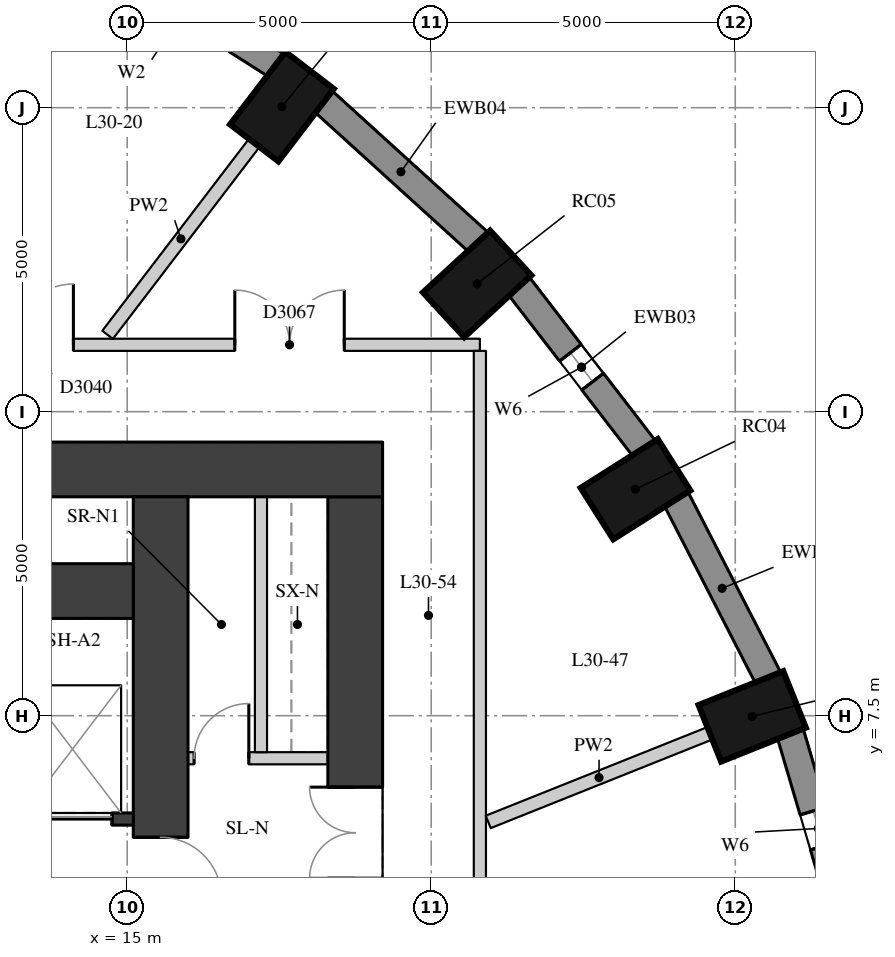
"""IFC4 building model, lengths in metres.
Left out: names, types, materials, properties, quantities, classifications, styles, units other than length and angle.
Written with IfcOpenShell. Run it as: python <this file> out.ifc"""

import sys

from ifc_helpers import new_model, si_unit, direction, frame, frame_2d, origin, origin_2d, place, context, subcontext, project, spatial, rectangle, extrude, element, fill, save


model = new_model("IFC4")
c1 = context("Model", 3, precision=1e-05, world=origin(), true_north=direction((0.0, 1.0)))
c2 = subcontext(c1, "Body", "Model", "MODEL_VIEW")
j1 = project(units=[si_unit("LENGTHUNIT", "METRE"), si_unit("PLANEANGLEUNIT", "RADIAN")], contexts=[c1])
p1 = place(None, origin())
s1 = spatial("IfcSite", under=j1, at=p1, CompositionType="ELEMENT")
p2 = place(p1, origin())
s2 = spatial("IfcBuilding", under=s1, at=p2, CompositionType="ELEMENT")
p3 = place(p2, frame((0.0, 0.0, 108.7)))
s3 = spatial("IfcBuildingStorey", under=s2, at=p3, CompositionType="ELEMENT", Elevation=108.7)
for number, where, z_axis, x_axis in (
    (1, (25.279, 7.489, 0.0), (0.0, 0.0, 1.0), (0.929, 0.371, 0.0)),
    (2, (23.36, 11.225, 0.0), (0.0, 0.0, 1.0), (0.845, 0.536, 0.0)),
    (3, (20.755, 14.602, 0.0), (0.0, 0.0, 1.0), (0.735, 0.678, 0.0)),
    (4, (17.545, 17.517, 0.0), (0.0, 0.0, 1.0), (0.607, 0.795, 0.0)),
):
    element("IfcColumn", number, at=place(p3, frame(where, z_axis=z_axis, x_axis=x_axis)), inside=s3, PredefinedType="COLUMN", context=c2, shape_type="SweptSolid", body=[
        extrude(rectangle(XDim=1.5, YDim=1.0, at=origin_2d()), origin(), (0.0, 0.0, 1.0), 3.3),
    ])
p4 = place(p3, frame((26.832, 4.069, 0.0), z_axis=(0.0, 0.0, 1.0), x_axis=(-0.283002902729, 0.959119052593, 0.0)))
e5 = element("IfcWall", 5, at=p4, inside=s3, PredefinedType="SOLIDWALL", context=c2, shape_type="SweptSolid", body=[
    extrude(rectangle(XDim=3.286, YDim=0.45, at=frame_2d((1.643, 0.0))), origin(), (0.0, 0.0, 1.0), 3.02),
])
p5 = place(p4, frame((1.343, 0.0, 0.4)))
e6 = element("IfcOpeningElement", 6, at=p5, cuts=e5, PredefinedType="OPENING", context=c2, shape_type="SweptSolid", body=[
    extrude(rectangle(XDim=0.6, YDim=1.75, at=frame_2d((0.3, 0.875))), frame((0.0, 0.235, 0.0), z_axis=(0.0, -1.0, 0.0), x_axis=(1.0, 0.0, 0.0)), (0.0, 0.0, 1.0), 0.47),
])
p6 = place(p3, frame((25.545, 8.112, 0.0), z_axis=(0.0, 0.0, 1.0), x_axis=(-0.456828186229, 0.889554949549, 0.0)))
e7 = element("IfcWall", 7, at=p6, inside=s3, PredefinedType="SOLIDWALL", context=c2, shape_type="SweptSolid", body=[
    extrude(rectangle(XDim=3.333, YDim=0.45, at=frame_2d((1.667, 0.0))), origin(), (0.0, 0.0, 1.0), 3.02),
])
p7 = place(p3, frame((23.508, 11.887, 0.0), z_axis=(0.0, 0.0, 1.0), x_axis=(-0.610693945156, 0.791866721961, 0.0)))
e8 = element("IfcWall", 8, at=p7, inside=s3, PredefinedType="SOLIDWALL", context=c2, shape_type="SweptSolid", body=[
    extrude(rectangle(XDim=3.395, YDim=0.45, at=frame_2d((1.697, 0.0))), origin(), (0.0, 0.0, 1.0), 3.02),
])
p8 = place(p7, frame((1.397, 0.0, 0.4)))
e9 = element("IfcOpeningElement", 9, at=p8, cuts=e8, PredefinedType="OPENING", context=c2, shape_type="SweptSolid", body=[
    extrude(rectangle(XDim=0.6, YDim=1.75, at=frame_2d((0.3, 0.875))), frame((0.0, 0.235, 0.0), z_axis=(0.0, -1.0, 0.0), x_axis=(1.0, 0.0, 0.0)), (0.0, 0.0, 1.0), 0.47),
])
p9 = place(p3, frame((20.784, 15.281, 0.0), z_axis=(0.0, 0.0, 1.0), x_axis=(-0.74032902847, 0.672244694739, 0.0)))
e10 = element("IfcWall", 10, at=p9, inside=s3, PredefinedType="SOLIDWALL", context=c2, shape_type="SweptSolid", body=[
    extrude(rectangle(XDim=3.464, YDim=0.45, at=frame_2d((1.732, 0.0))), origin(), (0.0, 0.0, 1.0), 3.02),
])
p10 = place(p3, frame((17.456, 18.192, 0.0), z_axis=(0.0, 0.0, 1.0), x_axis=(-0.843880549131, 0.536531097699, 0.0)))
e11 = element("IfcWall", 11, at=p10, inside=s3, PredefinedType="SOLIDWALL", context=c2, shape_type="SweptSolid", body=[
    extrude(rectangle(XDim=3.532, YDim=0.45, at=frame_2d((1.766, 0.0))), origin(), (0.0, 0.0, 1.0), 3.02),
])
p11 = place(p10, frame((0.766, 0.0, 0.4)))
e12 = element("IfcOpeningElement", 12, at=p11, cuts=e11, PredefinedType="OPENING", context=c2, shape_type="SweptSolid", body=[
    extrude(rectangle(XDim=2.0, YDim=1.75, at=frame_2d((1.0, 0.875))), frame((0.0, 0.235, 0.0), z_axis=(0.0, -1.0, 0.0), x_axis=(1.0, 0.0, 0.0)), (0.0, 0.0, 1.0), 0.47),
])
p12 = place(p3, frame((18.75, -11.1, 0.0), z_axis=(0.0, 0.0, 1.0), x_axis=(0.0, 1.0, 0.0)))
e13 = element("IfcWall", 13, at=p12, inside=s3, PredefinedType="SHEAR", context=c2, shape_type="SweptSolid", body=[
    extrude(rectangle(XDim=22.2, YDim=0.9, at=frame_2d((11.1, 0.0))), origin(), (0.0, 0.0, 1.0), 3.02),
])
p13 = place(p12, frame((15.925, 0.0, 0.0)))
e14 = element("IfcOpeningElement", 14, at=p13, cuts=e13, PredefinedType="OPENING", context=c2, shape_type="SweptSolid", body=[
    extrude(rectangle(XDim=1.5, YDim=2.1, at=frame_2d((0.75, 1.05))), frame((0.0, 0.46, 0.0), z_axis=(0.0, -1.0, 0.0), x_axis=(1.0, 0.0, 0.0)), (0.0, 0.0, 1.0), 0.92),
])
p14 = place(p12, frame((4.525, 0.0, 0.0)))
e15 = element("IfcOpeningElement", 15, at=p14, cuts=e13, PredefinedType="OPENING", context=c2, shape_type="SweptSolid", body=[
    extrude(rectangle(XDim=1.5, YDim=2.1, at=frame_2d((0.75, 1.05))), frame((0.0, 0.46, 0.0), z_axis=(0.0, -1.0, 0.0), x_axis=(1.0, 0.0, 0.0)), (0.0, 0.0, 1.0), 0.92),
])
p15 = place(p3, frame((4.0, 11.55, 0.0), z_axis=(0.0, 0.0, 1.0), x_axis=(1.0, 0.0, 0.0)))
e16 = element("IfcWall", 16, at=p15, inside=s3, PredefinedType="SHEAR", context=c2, shape_type="SweptSolid", body=[
    extrude(rectangle(XDim=15.2, YDim=0.9, at=frame_2d((7.6, 0.0))), origin(), (0.0, 0.0, 1.0), 3.02),
])
p16 = place(p3, frame((15.55, -11.1, 0.0), z_axis=(0.0, 0.0, 1.0), x_axis=(0.0, 1.0, 0.0)))
e17 = element("IfcWall", 17, at=p16, inside=s3, PredefinedType="SHEAR", context=c2, shape_type="SweptSolid", body=[
    extrude(rectangle(XDim=22.2, YDim=0.9, at=frame_2d((11.1, 0.0))), origin(), (0.0, 0.0, 1.0), 3.02),
])
p17 = place(p16, frame((15.6, 0.0, 0.0)))
e18 = element("IfcOpeningElement", 18, at=p17, cuts=e17, PredefinedType="OPENING", context=c2, shape_type="SweptSolid", body=[
    extrude(rectangle(XDim=1.0, YDim=2.1, at=frame_2d((0.5, 1.05))), frame((0.0, 0.46, 0.0), z_axis=(0.0, -1.0, 0.0), x_axis=(1.0, 0.0, 0.0)), (0.0, 0.0, 1.0), 0.92),
])
p18 = place(p16, frame((5.6, 0.0, 0.0)))
e19 = element("IfcOpeningElement", 19, at=p18, cuts=e17, PredefinedType="OPENING", context=c2, shape_type="SweptSolid", body=[
    extrude(rectangle(XDim=1.0, YDim=2.1, at=frame_2d((0.5, 1.05))), frame((0.0, 0.46, 0.0), z_axis=(0.0, -1.0, 0.0), x_axis=(1.0, 0.0, 0.0)), (0.0, 0.0, 1.0), 0.92),
])
p19 = place(p3, frame((4.9, 9.55, 0.0), z_axis=(0.0, 0.0, 1.0), x_axis=(1.0, 0.0, 0.0)))
e20 = element("IfcWall", 20, at=p19, inside=s3, PredefinedType="SHEAR", context=c2, shape_type="SweptSolid", body=[
    extrude(rectangle(XDim=10.2, YDim=0.9, at=frame_2d((5.1, 0.0))), origin(), (0.0, 0.0, 1.0), 3.02),
])
p20 = place(p3, frame((4.9, 5.8, 0.0), z_axis=(0.0, 0.0, 1.0), x_axis=(1.0, 0.0, 0.0)))
e21 = element("IfcWall", 21, at=p20, inside=s3, PredefinedType="SHEAR", context=c2, shape_type="SweptSolid", body=[
    extrude(rectangle(XDim=10.2, YDim=0.2, at=frame_2d((5.1, 0.0))), origin(), (0.0, 0.0, 1.0), 3.02),
])
p21 = place(p20, frame((6.75, 0.0, 0.0)))
e22 = element("IfcOpeningElement", 22, at=p21, cuts=e21, PredefinedType="OPENING", context=c2, shape_type="SweptSolid", body=[
    extrude(rectangle(XDim=1.1, YDim=2.1, at=frame_2d((0.55, 1.05))), frame((0.0, 0.11, 0.0), z_axis=(0.0, -1.0, 0.0), x_axis=(1.0, 0.0, 0.0)), (0.0, 0.0, 1.0), 0.22),
])
p22 = place(p20, frame((8.75, 0.0, 0.0)))
e23 = element("IfcOpeningElement", 23, at=p22, cuts=e21, PredefinedType="OPENING", context=c2, shape_type="SweptSolid", body=[
    extrude(rectangle(XDim=1.1, YDim=2.1, at=frame_2d((0.55, 1.05))), frame((0.0, 0.11, 0.0), z_axis=(0.0, -1.0, 0.0), x_axis=(1.0, 0.0, 0.0)), (0.0, 0.0, 1.0), 0.22),
])
p23 = place(p3, frame((16.0, 6.8, 0.0), z_axis=(0.0, 0.0, 1.0), x_axis=(1.0, 0.0, 0.0)))
e24 = element("IfcWall", 24, at=p23, inside=s3, PredefinedType="PARTITIONING", context=c2, shape_type="SweptSolid", body=[
    extrude(rectangle(XDim=2.3, YDim=0.2, at=frame_2d((1.15, 0.0))), origin(), (0.0, 0.0, 1.0), 3.02),
])
p24 = place(p23, frame((0.1, 0.0, 0.0)))
e25 = element("IfcOpeningElement", 25, at=p24, cuts=e24, PredefinedType="OPENING", context=c2, shape_type="SweptSolid", body=[
    extrude(rectangle(XDim=0.9, YDim=2.1, at=frame_2d((0.45, 1.05))), frame((0.0, 0.11, 0.0), z_axis=(0.0, -1.0, 0.0), x_axis=(1.0, 0.0, 0.0)), (0.0, 0.0, 1.0), 0.22),
])
p25 = place(p3, frame((17.2, 6.9, 0.0), z_axis=(0.0, 0.0, 1.0), x_axis=(0.0, 1.0, 0.0)))
e26 = element("IfcWall", 26, at=p25, inside=s3, PredefinedType="PARTITIONING", context=c2, shape_type="SweptSolid", body=[
    extrude(rectangle(XDim=4.2, YDim=0.2, at=frame_2d((2.1, 0.0))), origin(), (0.0, 0.0, 1.0), 3.02),
])
p26 = place(p3, frame((5.303, 13.6, 0.0), z_axis=(0.0, 0.0, 1.0), x_axis=(1.0, 0.0, 0.0)))
e27 = element("IfcWall", 27, at=p26, inside=s3, PredefinedType="PARTITIONING", context=c2, shape_type="SweptSolid", body=[
    extrude(rectangle(XDim=15.497, YDim=0.2, at=frame_2d((7.749, 0.0))), origin(), (0.0, 0.0, 1.0), 3.02),
])
p27 = place(p26, frame((7.812, 0.0, 0.0)))
e28 = element("IfcOpeningElement", 28, at=p27, cuts=e27, PredefinedType="OPENING", context=c2, shape_type="SweptSolid", body=[
    extrude(rectangle(XDim=1.0, YDim=2.1, at=frame_2d((0.5, 1.05))), frame((0.0, 0.11, 0.0), z_axis=(0.0, -1.0, 0.0), x_axis=(1.0, 0.0, 0.0)), (0.0, 0.0, 1.0), 0.22),
])
p28 = place(p26, frame((0.957, 0.0, 0.0)))
e29 = element("IfcOpeningElement", 29, at=p28, cuts=e27, PredefinedType="OPENING", context=c2, shape_type="SweptSolid", body=[
    extrude(rectangle(XDim=1.1, YDim=2.1, at=frame_2d((0.55, 1.05))), frame((0.0, 0.11, 0.0), z_axis=(0.0, -1.0, 0.0), x_axis=(1.0, 0.0, 0.0)), (0.0, 0.0, 1.0), 0.22),
])
p29 = place(p26, frame((11.467, 0.0, 0.0)))
e30 = element("IfcOpeningElement", 30, at=p29, cuts=e27, PredefinedType="OPENING", context=c2, shape_type="SweptSolid", body=[
    extrude(rectangle(XDim=1.8, YDim=2.1, at=frame_2d((0.9, 1.05))), frame((0.0, 0.11, 0.0), z_axis=(0.0, -1.0, 0.0), x_axis=(1.0, 0.0, 0.0)), (0.0, 0.0, 1.0), 0.22),
])
p30 = place(p3, frame((20.8, 13.5, 0.0), z_axis=(0.0, 0.0, 1.0), x_axis=(0.0, -1.0, 0.0)))
e31 = element("IfcWall", 31, at=p30, inside=s3, PredefinedType="PARTITIONING", context=c2, shape_type="SweptSolid", body=[
    extrude(rectangle(XDim=27.1, YDim=0.2, at=frame_2d((13.55, 0.0))), origin(), (0.0, 0.0, 1.0), 3.02),
])
p31 = place(p30, frame((22.844, 0.0, 0.0)))
e32 = element("IfcOpeningElement", 32, at=p31, cuts=e31, PredefinedType="OPENING", context=c2, shape_type="SweptSolid", body=[
    extrude(rectangle(XDim=1.8, YDim=2.1, at=frame_2d((0.9, 1.05))), frame((0.0, 0.11, 0.0), z_axis=(0.0, -1.0, 0.0), x_axis=(1.0, 0.0, 0.0)), (0.0, 0.0, 1.0), 0.22),
])
p32 = place(p30, frame((16.35, 0.0, 0.0)))
e33 = element("IfcOpeningElement", 33, at=p32, cuts=e31, PredefinedType="OPENING", context=c2, shape_type="SweptSolid", body=[
    extrude(rectangle(XDim=1.8, YDim=2.1, at=frame_2d((0.9, 1.05))), frame((0.0, 0.11, 0.0), z_axis=(0.0, -1.0, 0.0), x_axis=(1.0, 0.0, 0.0)), (0.0, 0.0, 1.0), 0.22),
])
p33 = place(p30, frame((10.051, 0.0, 0.0)))
e34 = element("IfcOpeningElement", 34, at=p33, cuts=e31, PredefinedType="OPENING", context=c2, shape_type="SweptSolid", body=[
    extrude(rectangle(XDim=1.8, YDim=2.1, at=frame_2d((0.9, 1.05))), frame((0.0, 0.11, 0.0), z_axis=(0.0, -1.0, 0.0), x_axis=(1.0, 0.0, 0.0)), (0.0, 0.0, 1.0), 0.22),
])
p34 = place(p3, frame((24.583, 7.21, 0.0), z_axis=(0.0, 0.0, 1.0), x_axis=(-0.928528147853, -0.371262008083, 0.0)))
e35 = element("IfcWall", 35, at=p34, inside=s3, PredefinedType="PARTITIONING", context=c2, shape_type="SweptSolid", body=[
    extrude(rectangle(XDim=3.926, YDim=0.22, at=frame_2d((1.963, 0.0))), origin(), (0.0, 0.0, 1.0), 3.02),
])
p35 = place(p3, frame((17.089, 16.921, 0.0), z_axis=(0.0, 0.0, 1.0), x_axis=(-0.607055443677, -0.794659479464, 0.0)))
e36 = element("IfcWall", 36, at=p35, inside=s3, PredefinedType="PARTITIONING", context=c2, shape_type="SweptSolid", body=[
    extrude(rectangle(XDim=3.973, YDim=0.22, at=frame_2d((1.987, 0.0))), origin(), (0.0, 0.0, 1.0), 3.02),
])
p36 = place(p5, origin())
e37 = element("IfcWindow", 37, at=p36, inside=s3, PartitioningType="SINGLE_PANEL", PredefinedType="WINDOW", context=c2, shape_type="SweptSolid", body=[
    extrude(rectangle(XDim=0.6, YDim=1.75, at=frame_2d((0.3, 0.875))), frame((0.0, 0.035, 0.0), z_axis=(0.0, -1.0, 0.0), x_axis=(1.0, 0.0, 0.0)), (0.0, 0.0, 1.0), 0.06),
])
fill(e6, e37)
p37 = place(p8, origin())
e38 = element("IfcWindow", 38, at=p37, inside=s3, PartitioningType="SINGLE_PANEL", PredefinedType="WINDOW", context=c2, shape_type="SweptSolid", body=[
    extrude(rectangle(XDim=0.6, YDim=1.75, at=frame_2d((0.3, 0.875))), frame((0.0, 0.035, 0.0), z_axis=(0.0, -1.0, 0.0), x_axis=(1.0, 0.0, 0.0)), (0.0, 0.0, 1.0), 0.06),
])
fill(e9, e38)
p38 = place(p13, origin())
e39 = element("IfcDoor", 39, at=p38, inside=s3, OperationType="DOUBLE_DOOR_SINGLE_SWING", PredefinedType="DOOR", context=c2, shape_type="SweptSolid", body=[
    extrude(rectangle(XDim=1.5, YDim=2.1, at=frame_2d((0.75, 1.05))), frame((0.0, 0.025, 0.0), z_axis=(0.0, -1.0, 0.0), x_axis=(1.0, 0.0, 0.0)), (0.0, 0.0, 1.0), 0.05),
])
fill(e14, e39)
p39 = place(p22, origin())
e40 = element("IfcDoor", 40, at=p39, inside=s3, OperationType="DOUBLE_DOOR_SLIDING", PredefinedType="DOOR", context=c2, shape_type="SweptSolid", body=[
    extrude(rectangle(XDim=1.1, YDim=2.1, at=frame_2d((0.55, 1.05))), frame((0.0, 0.025, 0.0), z_axis=(0.0, -1.0, 0.0), x_axis=(1.0, 0.0, 0.0)), (0.0, 0.0, 1.0), 0.05),
])
fill(e23, e40)
p40 = place(p17, origin())
e41 = element("IfcDoor", 41, at=p40, inside=s3, OperationType="SINGLE_SWING_RIGHT", PredefinedType="DOOR", context=c2, shape_type="SweptSolid", body=[
    extrude(rectangle(XDim=1.0, YDim=2.1, at=frame_2d((0.5, 1.05))), frame((0.0, 0.025, 0.0), z_axis=(0.0, -1.0, 0.0), x_axis=(1.0, 0.0, 0.0)), (0.0, 0.0, 1.0), 0.05),
])
fill(e18, e41)
p41 = place(p24, origin())
e42 = element("IfcDoor", 42, at=p41, inside=s3, OperationType="SINGLE_SWING_RIGHT", PredefinedType="DOOR", context=c2, shape_type="SweptSolid", body=[
    extrude(rectangle(XDim=0.9, YDim=2.1, at=frame_2d((0.45, 1.05))), frame((0.0, 0.025, 0.0), z_axis=(0.0, -1.0, 0.0), x_axis=(1.0, 0.0, 0.0)), (0.0, 0.0, 1.0), 0.05),
])
fill(e25, e42)
p42 = place(p27, origin())
e43 = element("IfcDoor", 43, at=p42, inside=s3, OperationType="SINGLE_SWING_RIGHT", PredefinedType="DOOR", context=c2, shape_type="SweptSolid", body=[
    extrude(rectangle(XDim=1.0, YDim=2.1, at=frame_2d((0.5, 1.05))), frame((0.0, 0.025, 0.0), z_axis=(0.0, -1.0, 0.0), x_axis=(1.0, 0.0, 0.0)), (0.0, 0.0, 1.0), 0.05),
])
fill(e28, e43)
p43 = place(p29, origin())
e44 = element("IfcDoor", 44, at=p43, inside=s3, OperationType="DOUBLE_DOOR_SINGLE_SWING", PredefinedType="DOOR", context=c2, shape_type="SweptSolid", body=[
    extrude(rectangle(XDim=1.8, YDim=2.1, at=frame_2d((0.9, 1.05))), frame((0.0, 0.025, 0.0), z_axis=(0.0, -1.0, 0.0), x_axis=(1.0, 0.0, 0.0)), (0.0, 0.0, 1.0), 0.05),
])
fill(e30, e44)
save(model, sys.argv[1])
